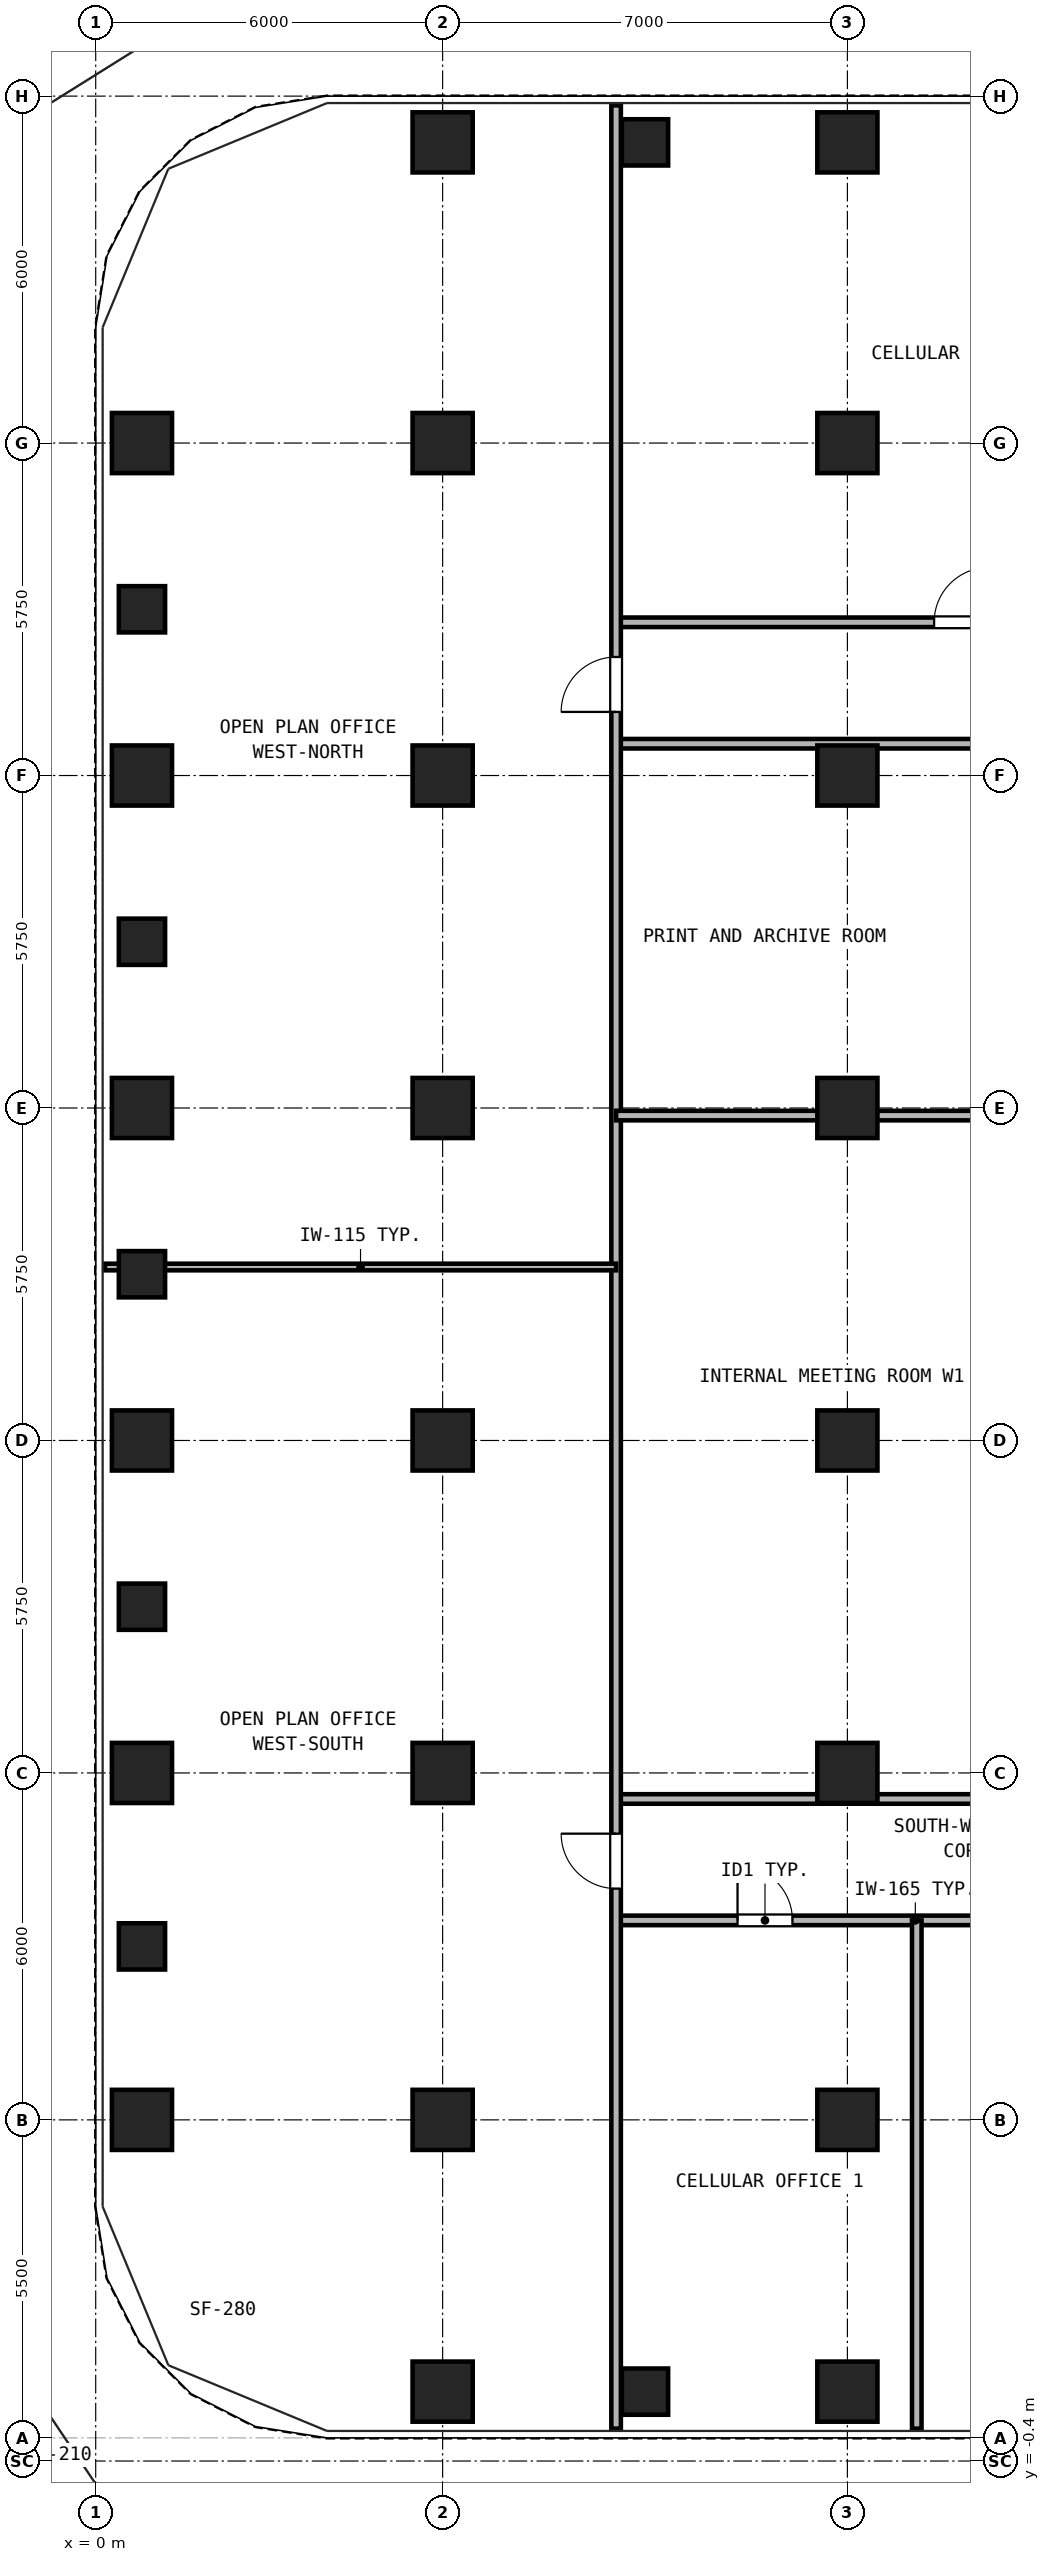
"""IFC4 building model, lengths in metres.
Left out: names, types, materials, properties, quantities, classifications, styles, units other than length and angle.
Written with IfcOpenShell. Run it as: python <this file> out.ifc"""

import sys

from ifc_helpers import new_model, si_unit, direction, frame, frame_2d, origin, origin_2d, place, context, subcontext, project, spatial, rectangle, hollow_rectangle, extrude, source, transform, mapped, element, fill, save


model = new_model("IFC4")
c1 = context("Model", 3, precision=1e-05, world=origin(), true_north=direction((0.0, 1.0)))
c2 = subcontext(c1, "Body", "Model", "MODEL_VIEW")
j1 = project(units=[si_unit("LENGTHUNIT", "METRE"), si_unit("PLANEANGLEUNIT", "RADIAN")], contexts=[c1])
p1 = place(None, origin())
s1 = spatial("IfcSite", under=j1, at=p1, CompositionType="ELEMENT")
p2 = place(p1, origin())
s2 = spatial("IfcBuilding", under=s1, at=p2, CompositionType="ELEMENT")
p3 = place(p2, frame((0.0, 0.0, 51.3)))
s3 = spatial("IfcBuildingStorey", under=s2, at=p3, CompositionType="ELEMENT", Elevation=51.3)
m1 = source(origin(), c2, "Body", "SweptSolid", [
    extrude(hollow_rectangle(XDim=1.04, YDim=1.04, WallThickness=0.065, at=origin_2d()), origin(), (0.0, 0.0, 1.0), 3.32),
])
for number, where, z_axis, x_axis in (
    (1, (6.0, 0.8, 0.0), (0.0, 0.0, 1.0), (1.0, 0.0, 0.0)),
    (2, (6.0, 39.7, 0.0), (0.0, 0.0, 1.0), (1.0, 0.0, 0.0)),
    (3, (13.0, 0.8, 0.0), (0.0, 0.0, 1.0), (1.0, 0.0, 0.0)),
    (4, (13.0, 39.7, 0.0), (0.0, 0.0, 1.0), (1.0, 0.0, 0.0)),
    (5, (0.8, 5.5, 0.0), (0.0, 0.0, 1.0), (1.0, 0.0, 0.0)),
    (6, (0.8, 11.5, 0.0), (0.0, 0.0, 1.0), (1.0, 0.0, 0.0)),
    (7, (0.8, 17.25, 0.0), (0.0, 0.0, 1.0), (1.0, 0.0, 0.0)),
    (8, (0.8, 23.0, 0.0), (0.0, 0.0, 1.0), (1.0, 0.0, 0.0)),
    (9, (0.8, 28.75, 0.0), (0.0, 0.0, 1.0), (1.0, 0.0, 0.0)),
    (10, (0.8, 34.5, 0.0), (0.0, 0.0, 1.0), (1.0, 0.0, 0.0)),
    (11, (6.0, 5.5, 0.0), (0.0, 0.0, 1.0), (1.0, 0.0, 0.0)),
    (12, (6.0, 11.5, 0.0), (0.0, 0.0, 1.0), (1.0, 0.0, 0.0)),
    (13, (6.0, 17.25, 0.0), (0.0, 0.0, 1.0), (1.0, 0.0, 0.0)),
    (14, (6.0, 23.0, 0.0), (0.0, 0.0, 1.0), (1.0, 0.0, 0.0)),
    (15, (6.0, 28.75, 0.0), (0.0, 0.0, 1.0), (1.0, 0.0, 0.0)),
    (16, (6.0, 34.5, 0.0), (0.0, 0.0, 1.0), (1.0, 0.0, 0.0)),
    (17, (13.0, 5.5, 0.0), (0.0, 0.0, 1.0), (1.0, 0.0, 0.0)),
    (18, (13.0, 11.5, 0.0), (0.0, 0.0, 1.0), (1.0, 0.0, 0.0)),
    (19, (13.0, 17.25, 0.0), (0.0, 0.0, 1.0), (1.0, 0.0, 0.0)),
    (20, (13.0, 23.0, 0.0), (0.0, 0.0, 1.0), (1.0, 0.0, 0.0)),
    (21, (13.0, 28.75, 0.0), (0.0, 0.0, 1.0), (1.0, 0.0, 0.0)),
    (22, (13.0, 34.5, 0.0), (0.0, 0.0, 1.0), (1.0, 0.0, 0.0)),
):
    element("IfcColumn", number, at=place(p3, frame(where, z_axis=z_axis, x_axis=x_axis)), inside=s3, PredefinedType="COLUMN", context=c2, shape_type="MappedRepresentation", body=[
        mapped(m1, transform((0.0, 0.0, 0.0), x_axis=(1.0, 0.0, 0.0), y_axis=(0.0, 1.0, 0.0), z_axis=(0.0, 0.0, 1.0), scale=1.0)),
    ])
m2 = source(origin(), c2, "Body", "SweptSolid", [
    extrude(hollow_rectangle(XDim=0.8, YDim=0.8, WallThickness=0.045, at=origin_2d()), origin(), (0.0, 0.0, 1.0), 3.32),
])
for number, where, z_axis, x_axis in (
    (23, (9.5, 0.8, 0.0), (0.0, 0.0, 1.0), (1.0, 0.0, 0.0)),
    (24, (9.5, 39.7, 0.0), (0.0, 0.0, 1.0), (1.0, 0.0, 0.0)),
    (25, (0.8, 8.5, 0.0), (0.0, 0.0, 1.0), (1.0, 0.0, 0.0)),
    (26, (0.8, 14.375, 0.0), (0.0, 0.0, 1.0), (1.0, 0.0, 0.0)),
    (27, (0.8, 20.125, 0.0), (0.0, 0.0, 1.0), (1.0, 0.0, 0.0)),
    (28, (0.8, 25.875, 0.0), (0.0, 0.0, 1.0), (1.0, 0.0, 0.0)),
    (29, (0.8, 31.625, 0.0), (0.0, 0.0, 1.0), (1.0, 0.0, 0.0)),
):
    element("IfcColumn", number, at=place(p3, frame(where, z_axis=z_axis, x_axis=x_axis)), inside=s3, PredefinedType="COLUMN", context=c2, shape_type="MappedRepresentation", body=[
        mapped(m2, transform((0.0, 0.0, 0.0), x_axis=(1.0, 0.0, 0.0), y_axis=(0.0, 1.0, 0.0), z_axis=(0.0, 0.0, 1.0), scale=1.0)),
    ])
p4 = place(p3, frame((9.0, 8.95, 0.0), z_axis=(0.0, 0.0, 1.0), x_axis=(1.0, 0.0, 0.0)))
e30 = element("IfcWall", 30, at=p4, inside=s3, PredefinedType="PARTITIONING", context=c2, shape_type="SweptSolid", body=[
    extrude(rectangle(XDim=29.0, YDim=0.165, at=frame_2d((14.5, 0.0))), origin(), (0.0, 0.0, 1.0), 3.32),
])
p5 = place(p4, frame((2.1, 0.0, 0.0)))
e31 = element("IfcOpeningElement", 31, at=p5, cuts=e30, PredefinedType="OPENING", context=c2, shape_type="SweptSolid", body=[
    extrude(rectangle(XDim=0.95, YDim=2.15, at=frame_2d((0.475, 1.075))), frame((0.0, 0.093, 0.0), z_axis=(0.0, -1.0, 0.0), x_axis=(1.0, 0.0, 0.0)), (0.0, 0.0, 1.0), 0.185),
])
p6 = place(p4, frame((7.3, 0.0, 0.0)))
e32 = element("IfcOpeningElement", 32, at=p6, cuts=e30, PredefinedType="OPENING", context=c2, shape_type="SweptSolid", body=[
    extrude(rectangle(XDim=0.95, YDim=2.15, at=frame_2d((0.475, 1.075))), frame((0.0, 0.093, 0.0), z_axis=(0.0, -1.0, 0.0), x_axis=(1.0, 0.0, 0.0)), (0.0, 0.0, 1.0), 0.185),
])
p7 = place(p4, frame((12.5, 0.0, 0.0)))
e33 = element("IfcOpeningElement", 33, at=p7, cuts=e30, PredefinedType="OPENING", context=c2, shape_type="SweptSolid", body=[
    extrude(rectangle(XDim=0.95, YDim=2.15, at=frame_2d((0.475, 1.075))), frame((0.0, 0.093, 0.0), z_axis=(0.0, -1.0, 0.0), x_axis=(1.0, 0.0, 0.0)), (0.0, 0.0, 1.0), 0.185),
])
p8 = place(p4, frame((17.7, 0.0, 0.0)))
e34 = element("IfcOpeningElement", 34, at=p8, cuts=e30, PredefinedType="OPENING", context=c2, shape_type="SweptSolid", body=[
    extrude(rectangle(XDim=0.95, YDim=2.15, at=frame_2d((0.475, 1.075))), frame((0.0, 0.093, 0.0), z_axis=(0.0, -1.0, 0.0), x_axis=(1.0, 0.0, 0.0)), (0.0, 0.0, 1.0), 0.185),
])
p9 = place(p4, frame((22.3, 0.0, 0.0)))
e35 = element("IfcOpeningElement", 35, at=p9, cuts=e30, PredefinedType="OPENING", context=c2, shape_type="SweptSolid", body=[
    extrude(rectangle(XDim=0.95, YDim=2.15, at=frame_2d((0.475, 1.075))), frame((0.0, 0.093, 0.0), z_axis=(0.0, -1.0, 0.0), x_axis=(1.0, 0.0, 0.0)), (0.0, 0.0, 1.0), 0.185),
])
p10 = place(p4, frame((25.4, 0.0, 0.0)))
e36 = element("IfcOpeningElement", 36, at=p10, cuts=e30, PredefinedType="OPENING", context=c2, shape_type="SweptSolid", body=[
    extrude(rectangle(XDim=0.92, YDim=2.1, at=frame_2d((0.46, 1.05))), frame((0.0, 0.093, 0.0), z_axis=(0.0, -1.0, 0.0), x_axis=(1.0, 0.0, 0.0)), (0.0, 0.0, 1.0), 0.185),
])
p11 = place(p4, frame((27.5, 0.0, 0.0)))
e37 = element("IfcOpeningElement", 37, at=p11, cuts=e30, PredefinedType="OPENING", context=c2, shape_type="SweptSolid", body=[
    extrude(rectangle(XDim=0.92, YDim=2.1, at=frame_2d((0.46, 1.05))), frame((0.0, 0.093, 0.0), z_axis=(0.0, -1.0, 0.0), x_axis=(1.0, 0.0, 0.0)), (0.0, 0.0, 1.0), 0.185),
])
p12 = place(p3, frame((9.0, 31.4, 0.0), z_axis=(0.0, 0.0, 1.0), x_axis=(1.0, 0.0, 0.0)))
e38 = element("IfcWall", 38, at=p12, inside=s3, PredefinedType="PARTITIONING", context=c2, shape_type="SweptSolid", body=[
    extrude(rectangle(XDim=29.0, YDim=0.165, at=frame_2d((14.5, 0.0))), origin(), (0.0, 0.0, 1.0), 2.898),
])
p13 = place(p12, frame((5.5, 0.0, 0.0)))
e39 = element("IfcOpeningElement", 39, at=p13, cuts=e38, PredefinedType="OPENING", context=c2, shape_type="SweptSolid", body=[
    extrude(rectangle(XDim=0.95, YDim=2.15, at=frame_2d((0.475, 1.075))), frame((0.0, 0.093, 0.0), z_axis=(0.0, -1.0, 0.0), x_axis=(1.0, 0.0, 0.0)), (0.0, 0.0, 1.0), 0.185),
])
p14 = place(p12, frame((15.0, 0.0, 0.0)))
e40 = element("IfcOpeningElement", 40, at=p14, cuts=e38, PredefinedType="OPENING", context=c2, shape_type="SweptSolid", body=[
    extrude(rectangle(XDim=0.95, YDim=2.15, at=frame_2d((0.475, 1.075))), frame((0.0, 0.093, 0.0), z_axis=(0.0, -1.0, 0.0), x_axis=(1.0, 0.0, 0.0)), (0.0, 0.0, 1.0), 0.185),
])
p15 = place(p12, frame((21.25, 0.0, 0.0)))
e41 = element("IfcOpeningElement", 41, at=p15, cuts=e38, PredefinedType="OPENING", context=c2, shape_type="SweptSolid", body=[
    extrude(rectangle(XDim=0.95, YDim=2.15, at=frame_2d((0.475, 1.075))), frame((0.0, 0.093, 0.0), z_axis=(0.0, -1.0, 0.0), x_axis=(1.0, 0.0, 0.0)), (0.0, 0.0, 1.0), 0.185),
])
p16 = place(p12, frame((26.25, 0.0, 0.0)))
e42 = element("IfcOpeningElement", 42, at=p16, cuts=e38, PredefinedType="OPENING", context=c2, shape_type="SweptSolid", body=[
    extrude(rectangle(XDim=0.95, YDim=2.15, at=frame_2d((0.475, 1.075))), frame((0.0, 0.093, 0.0), z_axis=(0.0, -1.0, 0.0), x_axis=(1.0, 0.0, 0.0)), (0.0, 0.0, 1.0), 0.185),
])
for number, where, z_axis, x_axis in (
    (43, (9.0, 11.05, 0.0), (0.0, 0.0, 1.0), (1.0, 0.0, 0.0)),
    (44, (9.0, 29.3, 0.0), (0.0, 0.0, 1.0), (1.0, 0.0, 0.0)),
):
    element("IfcWall", number, at=place(p3, frame(where, z_axis=z_axis, x_axis=x_axis)), inside=s3, PredefinedType="PARTITIONING", context=c2, shape_type="SweptSolid", body=[
        extrude(rectangle(XDim=7.3, YDim=0.165, at=frame_2d((3.65, 0.0))), origin(), (0.0, 0.0, 1.0), 3.32),
    ])
p17 = place(p3, frame((9.0, 0.16, 0.0), z_axis=(0.0, 0.0, 1.0), x_axis=(0.0, 1.0, 0.0)))
e45 = element("IfcWall", 45, at=p17, inside=s3, PredefinedType="PARTITIONING", context=c2, shape_type="SweptSolid", body=[
    extrude(rectangle(XDim=40.18, YDim=0.165, at=frame_2d((20.09, 0.0))), origin(), (0.0, 0.0, 1.0), 3.32),
])
p18 = place(p17, frame((9.34, 0.0, 0.0)))
e46 = element("IfcOpeningElement", 46, at=p18, cuts=e45, PredefinedType="OPENING", context=c2, shape_type="SweptSolid", body=[
    extrude(rectangle(XDim=0.95, YDim=2.15, at=frame_2d((0.475, 1.075))), frame((0.0, 0.093, 0.0), z_axis=(0.0, -1.0, 0.0), x_axis=(1.0, 0.0, 0.0)), (0.0, 0.0, 1.0), 0.185),
])
p19 = place(p17, frame((29.69, 0.0, 0.0)))
e47 = element("IfcOpeningElement", 47, at=p19, cuts=e45, PredefinedType="OPENING", context=c2, shape_type="SweptSolid", body=[
    extrude(rectangle(XDim=0.95, YDim=2.15, at=frame_2d((0.475, 1.075))), frame((0.0, 0.093, 0.0), z_axis=(0.0, -1.0, 0.0), x_axis=(1.0, 0.0, 0.0)), (0.0, 0.0, 1.0), 0.185),
])
p20 = place(p3, frame((14.2, 0.16, 0.0), z_axis=(0.0, 0.0, 1.0), x_axis=(0.0, 1.0, 0.0)))
e48 = element("IfcWall", 48, at=p20, inside=s3, PredefinedType="PARTITIONING", context=c2, shape_type="SweptSolid", body=[
    extrude(rectangle(XDim=8.79, YDim=0.165, at=frame_2d((4.395, 0.0))), origin(), (0.0, 0.0, 1.0), 3.32),
])
p21 = place(p3, frame((0.16, 20.25, 0.0), z_axis=(0.0, 0.0, 1.0), x_axis=(1.0, 0.0, 0.0)))
e49 = element("IfcWall", 49, at=p21, inside=s3, PredefinedType="PARTITIONING", context=c2, shape_type="SweptSolid", body=[
    extrude(rectangle(XDim=8.84, YDim=0.115, at=frame_2d((4.42, 0.0))), origin(), (0.0, 0.0, 1.0), 2.898),
])
p22 = place(p3, frame((9.0, 22.869, 0.0), z_axis=(0.0, 0.0, 1.0), x_axis=(1.0, 0.0, 0.0)))
e50 = element("IfcWall", 50, at=p22, inside=s3, PredefinedType="PARTITIONING", context=c2, shape_type="SweptSolid", body=[
    extrude(rectangle(XDim=7.3, YDim=0.165, at=frame_2d((3.65, 0.0))), origin(), (0.0, 0.0, 1.0), 2.539),
])
p23 = place(p5, frame((0.95, 0.0, 0.0), z_axis=(0.0, 0.0, 1.0), x_axis=(-1.0, 0.0, 0.0)))
e51 = element("IfcDoor", 51, at=p23, inside=s3, OperationType="SINGLE_SWING_LEFT", PredefinedType="DOOR", context=c2, shape_type="SweptSolid", body=[
    extrude(rectangle(XDim=0.95, YDim=2.15, at=frame_2d((0.475, 1.075))), frame((0.0, 0.025, 0.0), z_axis=(0.0, -1.0, 0.0), x_axis=(1.0, 0.0, 0.0)), (0.0, 0.0, 1.0), 0.05),
])
fill(e31, e51)
p24 = place(p13, origin())
e52 = element("IfcDoor", 52, at=p24, inside=s3, OperationType="SINGLE_SWING_RIGHT", PredefinedType="DOOR", context=c2, shape_type="SweptSolid", body=[
    extrude(rectangle(XDim=0.95, YDim=2.15, at=frame_2d((0.475, 1.075))), frame((0.0, 0.025, 0.0), z_axis=(0.0, -1.0, 0.0), x_axis=(1.0, 0.0, 0.0)), (0.0, 0.0, 1.0), 0.05),
])
fill(e39, e52)
p25 = place(p18, frame((0.95, 0.0, 0.0), z_axis=(0.0, 0.0, 1.0), x_axis=(-1.0, 0.0, 0.0)))
e53 = element("IfcDoor", 53, at=p25, inside=s3, OperationType="SINGLE_SWING_RIGHT", PredefinedType="DOOR", context=c2, shape_type="SweptSolid", body=[
    extrude(rectangle(XDim=0.95, YDim=2.15, at=frame_2d((0.475, 1.075))), frame((0.0, 0.025, 0.0), z_axis=(0.0, -1.0, 0.0), x_axis=(1.0, 0.0, 0.0)), (0.0, 0.0, 1.0), 0.05),
])
fill(e46, e53)
p26 = place(p19, frame((0.95, 0.0, 0.0), z_axis=(0.0, 0.0, 1.0), x_axis=(-1.0, 0.0, 0.0)))
e54 = element("IfcDoor", 54, at=p26, inside=s3, OperationType="SINGLE_SWING_LEFT", PredefinedType="DOOR", context=c2, shape_type="SweptSolid", body=[
    extrude(rectangle(XDim=0.95, YDim=2.15, at=frame_2d((0.475, 1.075))), frame((0.0, 0.025, 0.0), z_axis=(0.0, -1.0, 0.0), x_axis=(1.0, 0.0, 0.0)), (0.0, 0.0, 1.0), 0.05),
])
fill(e47, e54)
save(model, sys.argv[1])
